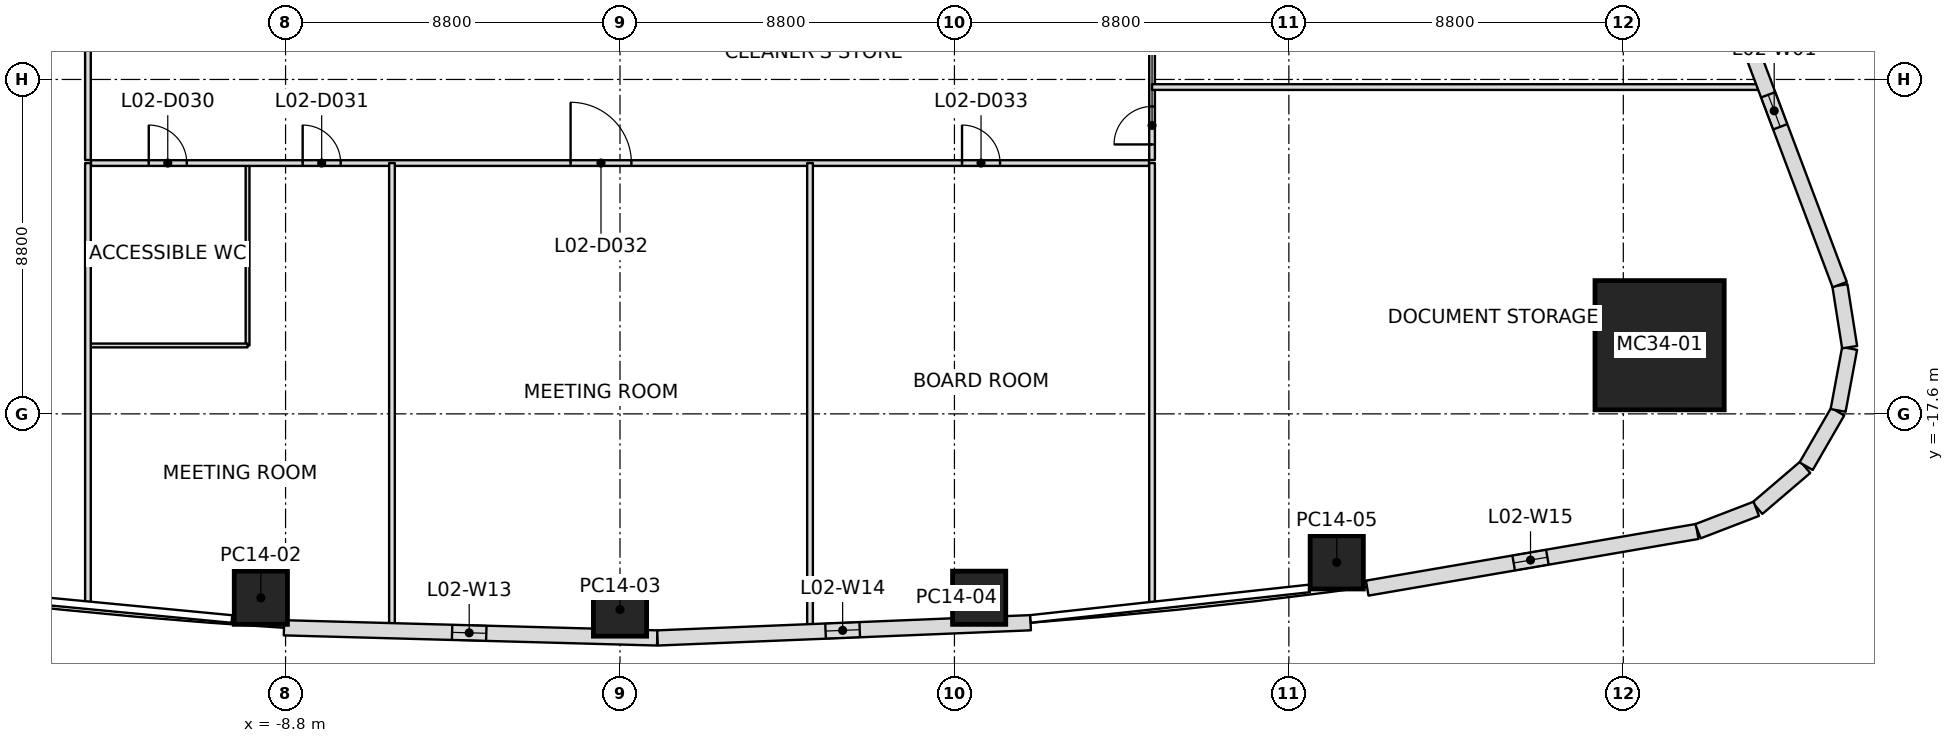
"""IFC4 building model, lengths in metres.
Left out: names, types, materials, properties, quantities, classifications, styles, units other than length and angle.
Written with IfcOpenShell. Run it as: python <this file> out.ifc"""

import sys

from ifc_helpers import new_model, si_unit, direction, frame, frame_2d, origin, origin_2d, place, context, subcontext, project, spatial, rectangle, extrude, element, fill, save


model = new_model("IFC4")
c1 = context("Model", 3, precision=1e-05, world=origin(), true_north=direction((0.0, 1.0)))
c2 = subcontext(c1, "Body", "Model", "MODEL_VIEW")
j1 = project(units=[si_unit("LENGTHUNIT", "METRE"), si_unit("PLANEANGLEUNIT", "RADIAN")], contexts=[c1])
p1 = place(None, origin())
s1 = spatial("IfcSite", under=j1, at=p1, CompositionType="ELEMENT")
p2 = place(p1, origin())
s2 = spatial("IfcBuilding", under=s1, at=p2, CompositionType="ELEMENT")
p3 = place(p2, frame((0.0, 0.0, 16.8)))
s3 = spatial("IfcBuildingStorey", under=s2, at=p3, CompositionType="ELEMENT", Elevation=16.8)
p4 = place(p3, frame((27.355, -15.793, 0.0), z_axis=(0.0, 0.0, 1.0), x_axis=(1.0, 0.0, 0.0)))
e1 = element("IfcColumn", 1, at=p4, inside=s3, PredefinedType="COLUMN", context=c2, shape_type="SweptSolid", body=[
    extrude(rectangle(XDim=3.4, YDim=3.4, at=origin_2d()), origin(), (0.0, 0.0, 1.0), 5.4),
])
for number, where, z_axis, x_axis in (
    (2, (-9.45, -22.439, 0.0), (0.0, 0.0, 1.0), (-0.998, 0.066, 0.0)),
    (3, (0.0, -22.75, 0.0), (0.0, 0.0, 1.0), (1.0, 0.0, 0.0)),
    (4, (9.45, -22.439, 0.0), (0.0, 0.0, 1.0), (0.998, 0.066, 0.0)),
    (5, (18.86, -21.508, 0.0), (0.0, 0.0, 1.0), (0.991, 0.131, 0.0)),
):
    element("IfcColumn", number, at=place(p3, frame(where, z_axis=z_axis, x_axis=x_axis)), inside=s3, PredefinedType="COLUMN", context=c2, shape_type="SweptSolid", body=[
        extrude(rectangle(XDim=1.4, YDim=1.4, at=origin_2d()), origin(), (0.0, 0.0, 1.0), 5.4),
    ])
for number, where, z_axis, x_axis in (
    (6, (31.19, -19.003, 0.0), (0.0, 0.0, 1.0), (-0.76, -0.65, 0.0)),
    (7, (32.041, -17.541, 0.0), (0.0, 0.0, 1.0), (-0.5, -0.866, 0.0)),
    (8, (32.355, -15.878, 0.0), (0.0, 0.0, 1.0), (-0.183, -0.983, 0.0)),
):
    element("IfcWall", number, at=place(p3, frame(where, z_axis=z_axis, x_axis=x_axis)), inside=s3, PredefinedType="STANDARD", context=c2, shape_type="SweptSolid", body=[
        extrude(rectangle(XDim=1.659, YDim=0.4, at=frame_2d((0.829, 0.0))), origin(), (0.0, 0.0, 1.0), 4.5),
    ])
p5 = place(p3, frame((32.099, -14.219, 0.0), z_axis=(0.0, 0.0, 1.0), x_axis=(0.155711266073, -0.98780261268, 0.0)))
e9 = element("IfcWall", 9, at=p5, inside=s3, PredefinedType="STANDARD", context=c2, shape_type="SweptSolid", body=[
    extrude(rectangle(XDim=1.646, YDim=0.4, at=frame_2d((0.823, 0.0))), origin(), (0.0, 0.0, 1.0), 4.5),
])
p6 = place(p3, frame((28.625, -4.993, 0.0), z_axis=(0.0, 0.0, 1.0), x_axis=(0.352569865932, -0.935785493389, 0.0)))
e10 = element("IfcWall", 10, at=p6, inside=s3, PredefinedType="STANDARD", context=c2, shape_type="SweptSolid", body=[
    extrude(rectangle(XDim=9.838, YDim=0.4, at=frame_2d((4.919, 0.0))), origin(), (0.0, 0.0, 1.0), 4.5),
])
p7 = place(p6, frame((4.5, 0.0, 1.2)))
e11 = element("IfcOpeningElement", 11, at=p7, cuts=e10, PredefinedType="OPENING", context=c2, shape_type="SweptSolid", body=[
    extrude(rectangle(XDim=0.9, YDim=2.4, at=frame_2d((0.45, 1.2))), frame((0.0, 0.2, 0.0), z_axis=(0.0, -1.0, 0.0), x_axis=(1.0, 0.0, 0.0)), (0.0, 0.0, 1.0), 0.4),
])
p8 = place(p3, frame((0.98, -23.497, 0.0), z_axis=(0.0, 0.0, 1.0), x_axis=(-0.999629782494, 0.027208416899, 0.0)))
e12 = element("IfcWall", 12, at=p8, inside=s3, PredefinedType="STANDARD", context=c2, shape_type="SweptSolid", body=[
    extrude(rectangle(XDim=9.825, YDim=0.4, at=frame_2d((4.913, 0.0))), origin(), (0.0, 0.0, 1.0), 4.5),
])
p9 = place(p8, frame((4.5, 0.0, 1.2)))
e13 = element("IfcOpeningElement", 13, at=p9, cuts=e12, PredefinedType="OPENING", context=c2, shape_type="SweptSolid", body=[
    extrude(rectangle(XDim=0.9, YDim=2.4, at=frame_2d((0.45, 1.2))), frame((0.0, 0.2, 0.0), z_axis=(0.0, -1.0, 0.0), x_axis=(1.0, 0.0, 0.0)), (0.0, 0.0, 1.0), 0.4),
])
p10 = place(p3, frame((10.804, -23.096, 0.0), z_axis=(0.0, 0.0, 1.0), x_axis=(-0.999167350404, -0.04079958195, 0.0)))
e14 = element("IfcWall", 14, at=p10, inside=s3, PredefinedType="STANDARD", context=c2, shape_type="SweptSolid", body=[
    extrude(rectangle(XDim=9.826, YDim=0.4, at=frame_2d((4.913, 0.0))), origin(), (0.0, 0.0, 1.0), 4.5),
])
p11 = place(p10, frame((4.5, 0.0, 1.2)))
e15 = element("IfcOpeningElement", 15, at=p11, cuts=e14, PredefinedType="OPENING", context=c2, shape_type="SweptSolid", body=[
    extrude(rectangle(XDim=0.9, YDim=2.4, at=frame_2d((0.45, 1.2))), frame((0.0, 0.2, 0.0), z_axis=(0.0, -1.0, 0.0), x_axis=(1.0, 0.0, 0.0)), (0.0, 0.0, 1.0), 0.4),
])
p12 = place(p3, frame((28.344, -20.695, 0.0), z_axis=(0.0, 0.0, 1.0), x_axis=(-0.985570785174, -0.169263780566, 0.0)))
e16 = element("IfcWall", 16, at=p12, inside=s3, PredefinedType="STANDARD", context=c2, shape_type="SweptSolid", body=[
    extrude(rectangle(XDim=8.81, YDim=0.4, at=frame_2d((4.405, 0.0))), origin(), (0.0, 0.0, 1.0), 4.5),
])
p13 = place(p12, frame((4.0, 0.0, 1.2)))
e17 = element("IfcOpeningElement", 17, at=p13, cuts=e16, PredefinedType="OPENING", context=c2, shape_type="SweptSolid", body=[
    extrude(rectangle(XDim=0.9, YDim=2.4, at=frame_2d((0.45, 1.2))), frame((0.0, 0.2, 0.0), z_axis=(0.0, -1.0, 0.0), x_axis=(1.0, 0.0, 0.0)), (0.0, 0.0, 1.0), 0.4),
])
p14 = place(p3, frame((29.9, -20.098, 0.0), z_axis=(0.0, 0.0, 1.0), x_axis=(-0.933315023429, -0.359058584415, 0.0)))
e18 = element("IfcWall", 18, at=p14, inside=s3, PredefinedType="STANDARD", context=c2, shape_type="SweptSolid", body=[
    extrude(rectangle(XDim=1.646, YDim=0.4, at=frame_2d((0.823, 0.0))), origin(), (0.0, 0.0, 1.0), 4.5),
])
p15 = place(p3, frame((-14.0, -11.0, 0.0), z_axis=(0.0, 0.0, 1.0), x_axis=(0.0, -1.0, 0.0)))
e19 = element("IfcWall", 19, at=p15, inside=s3, PredefinedType="PARTITIONING", context=c2, shape_type="SweptSolid", body=[
    extrude(rectangle(XDim=11.697, YDim=0.15, at=frame_2d((5.849, 0.0))), origin(), (0.0, 0.0, 1.0), 4.534),
])
p16 = place(p3, frame((-6.0, -11.0, 0.0), z_axis=(0.0, 0.0, 1.0), x_axis=(0.0, -1.0, 0.0)))
e20 = element("IfcWall", 20, at=p16, inside=s3, PredefinedType="PARTITIONING", context=c2, shape_type="SweptSolid", body=[
    extrude(rectangle(XDim=12.252, YDim=0.15, at=frame_2d((6.126, 0.0))), origin(), (0.0, 0.0, 1.0), 4.534),
])
p17 = place(p3, frame((5.0, -11.0, 0.0), z_axis=(0.0, 0.0, 1.0), x_axis=(0.0, -1.0, 0.0)))
e21 = element("IfcWall", 21, at=p17, inside=s3, PredefinedType="PARTITIONING", context=c2, shape_type="SweptSolid", body=[
    extrude(rectangle(XDim=12.293, YDim=0.15, at=frame_2d((6.146, 0.0))), origin(), (0.0, 0.0, 1.0), 4.534),
])
p18 = place(p3, frame((14.0, -11.0, 0.0), z_axis=(0.0, 0.0, 1.0), x_axis=(0.0, -1.0, 0.0)))
e22 = element("IfcWall", 22, at=p18, inside=s3, PredefinedType="PARTITIONING", context=c2, shape_type="SweptSolid", body=[
    extrude(rectangle(XDim=11.697, YDim=0.15, at=frame_2d((5.849, 0.0))), origin(), (0.0, 0.0, 1.0), 4.534),
])
p19 = place(p3, frame((14.0, -9.0, 0.0), z_axis=(0.0, 0.0, 1.0), x_axis=(1.0, 0.0, 0.0)))
e23 = element("IfcWall", 23, at=p19, inside=s3, PredefinedType="PARTITIONING", context=c2, shape_type="SweptSolid", body=[
    extrude(rectangle(XDim=16.093, YDim=0.15, at=frame_2d((8.046, 0.0))), origin(), (0.0, 0.0, 1.0), 4.534),
])
p20 = place(p3, frame((-14.0, 10.92, 0.0), z_axis=(0.0, 0.0, 1.0), x_axis=(0.0, -1.0, 0.0)))
e24 = element("IfcWall", 24, at=p20, inside=s3, PredefinedType="PARTITIONING", context=c2, shape_type="SweptSolid", body=[
    extrude(rectangle(XDim=21.84, YDim=0.15, at=frame_2d((10.92, 0.0))), origin(), (0.0, 0.0, 1.0), 4.247),
])
p21 = place(p20, frame((5.92, 0.0, 0.0)))
e25 = element("IfcOpeningElement", 25, at=p21, cuts=e24, PredefinedType="OPENING", context=c2, shape_type="SweptSolid", body=[
    extrude(rectangle(XDim=1.0, YDim=2.1, at=frame_2d((0.5, 1.05))), frame((0.0, 0.075, 0.0), z_axis=(0.0, -1.0, 0.0), x_axis=(1.0, 0.0, 0.0)), (0.0, 0.0, 1.0), 0.15),
])
p22 = place(p20, frame((16.93, 0.0, 0.0)))
e26 = element("IfcOpeningElement", 26, at=p22, cuts=e24, PredefinedType="OPENING", context=c2, shape_type="SweptSolid", body=[
    extrude(rectangle(XDim=1.0, YDim=2.1, at=frame_2d((0.5, 1.05))), frame((0.0, 0.075, 0.0), z_axis=(0.0, -1.0, 0.0), x_axis=(1.0, 0.0, 0.0)), (0.0, 0.0, 1.0), 0.15),
])
p23 = place(p3, frame((-13.92, -11.0, 0.0), z_axis=(0.0, 0.0, 1.0), x_axis=(1.0, 0.0, 0.0)))
e27 = element("IfcWall", 27, at=p23, inside=s3, PredefinedType="PARTITIONING", context=c2, shape_type="SweptSolid", body=[
    extrude(rectangle(XDim=27.84, YDim=0.15, at=frame_2d((13.92, 0.0))), origin(), (0.0, 0.0, 1.0), 4.547),
])
p24 = place(p23, frame((1.52, 0.0, 0.0)))
e28 = element("IfcOpeningElement", 28, at=p24, cuts=e27, PredefinedType="OPENING", context=c2, shape_type="SweptSolid", body=[
    extrude(rectangle(XDim=1.0, YDim=2.1, at=frame_2d((0.5, 1.05))), frame((0.0, 0.075, 0.0), z_axis=(0.0, -1.0, 0.0), x_axis=(1.0, 0.0, 0.0)), (0.0, 0.0, 1.0), 0.15),
])
p25 = place(p23, frame((5.57, 0.0, 0.0)))
e29 = element("IfcOpeningElement", 29, at=p25, cuts=e27, PredefinedType="OPENING", context=c2, shape_type="SweptSolid", body=[
    extrude(rectangle(XDim=1.0, YDim=2.1, at=frame_2d((0.5, 1.05))), frame((0.0, 0.075, 0.0), z_axis=(0.0, -1.0, 0.0), x_axis=(1.0, 0.0, 0.0)), (0.0, 0.0, 1.0), 0.15),
])
p26 = place(p23, frame((12.62, 0.0, 0.0)))
e30 = element("IfcOpeningElement", 30, at=p26, cuts=e27, PredefinedType="OPENING", context=c2, shape_type="SweptSolid", body=[
    extrude(rectangle(XDim=1.6, YDim=2.1, at=frame_2d((0.8, 1.05))), frame((0.0, 0.075, 0.0), z_axis=(0.0, -1.0, 0.0), x_axis=(1.0, 0.0, 0.0)), (0.0, 0.0, 1.0), 0.15),
])
p27 = place(p23, frame((22.92, 0.0, 0.0)))
e31 = element("IfcOpeningElement", 31, at=p27, cuts=e27, PredefinedType="OPENING", context=c2, shape_type="SweptSolid", body=[
    extrude(rectangle(XDim=1.0, YDim=2.1, at=frame_2d((0.5, 1.05))), frame((0.0, 0.075, 0.0), z_axis=(0.0, -1.0, 0.0), x_axis=(1.0, 0.0, 0.0)), (0.0, 0.0, 1.0), 0.15),
])
p28 = place(p3, frame((14.0, -10.92, 0.0), z_axis=(0.0, 0.0, 1.0), x_axis=(0.0, 1.0, 0.0)))
e32 = element("IfcWall", 32, at=p28, inside=s3, PredefinedType="PARTITIONING", context=c2, shape_type="SweptSolid", body=[
    extrude(rectangle(XDim=21.84, YDim=0.15, at=frame_2d((10.92, 0.0))), origin(), (0.0, 0.0, 1.0), 4.247),
])
p29 = place(p28, frame((14.52, 0.0, 0.0)))
e33 = element("IfcOpeningElement", 33, at=p29, cuts=e32, PredefinedType="OPENING", context=c2, shape_type="SweptSolid", body=[
    extrude(rectangle(XDim=1.0, YDim=2.1, at=frame_2d((0.5, 1.05))), frame((0.0, 0.075, 0.0), z_axis=(0.0, -1.0, 0.0), x_axis=(1.0, 0.0, 0.0)), (0.0, 0.0, 1.0), 0.15),
])
p30 = place(p28, frame((19.07, 0.0, 0.0)))
e34 = element("IfcOpeningElement", 34, at=p30, cuts=e32, PredefinedType="OPENING", context=c2, shape_type="SweptSolid", body=[
    extrude(rectangle(XDim=1.0, YDim=2.1, at=frame_2d((0.5, 1.05))), frame((0.0, 0.075, 0.0), z_axis=(0.0, -1.0, 0.0), x_axis=(1.0, 0.0, 0.0)), (0.0, 0.0, 1.0), 0.15),
])
p31 = place(p28, frame((0.41, 0.0, 0.0)))
e35 = element("IfcOpeningElement", 35, at=p31, cuts=e32, PredefinedType="OPENING", context=c2, shape_type="SweptSolid", body=[
    extrude(rectangle(XDim=1.0, YDim=2.1, at=frame_2d((0.5, 1.05))), frame((0.0, 0.075, 0.0), z_axis=(0.0, -1.0, 0.0), x_axis=(1.0, 0.0, 0.0)), (0.0, 0.0, 1.0), 0.15),
])
p32 = place(p28, frame((6.92, 0.0, 0.0)))
e36 = element("IfcOpeningElement", 36, at=p32, cuts=e32, PredefinedType="OPENING", context=c2, shape_type="SweptSolid", body=[
    extrude(rectangle(XDim=1.0, YDim=2.1, at=frame_2d((0.5, 1.05))), frame((0.0, 0.075, 0.0), z_axis=(0.0, -1.0, 0.0), x_axis=(1.0, 0.0, 0.0)), (0.0, 0.0, 1.0), 0.15),
])
p33 = place(p3, frame((-9.8, -11.03, 0.0), z_axis=(0.0, 0.0, 1.0), x_axis=(0.0, -1.0, 0.0)))
e37 = element("IfcWall", 37, at=p33, inside=s3, PredefinedType="PARTITIONING", context=c2, shape_type="SweptSolid", body=[
    extrude(rectangle(XDim=4.77, YDim=0.1, at=frame_2d((2.385, 0.0))), origin(), (0.0, 0.0, 1.0), 4.75),
])
p34 = place(p3, frame((-9.8, -15.8, 0.0), z_axis=(0.0, 0.0, 1.0), x_axis=(-1.0, 0.0, 0.0)))
e38 = element("IfcWall", 38, at=p34, inside=s3, PredefinedType="PARTITIONING", context=c2, shape_type="SweptSolid", body=[
    extrude(rectangle(XDim=4.17, YDim=0.1, at=frame_2d((2.085, 0.0))), origin(), (0.0, 0.0, 1.0), 4.617),
])
p35 = place(p7, origin())
e39 = element("IfcWindow", 39, at=p35, inside=s3, PartitioningType="SINGLE_PANEL", PredefinedType="WINDOW", context=c2, shape_type="SweptSolid", body=[
    extrude(rectangle(XDim=0.9, YDim=2.4, at=frame_2d((0.45, 1.2))), frame((0.0, 0.03, 0.0), z_axis=(0.0, -1.0, 0.0), x_axis=(1.0, 0.0, 0.0)), (0.0, 0.0, 1.0), 0.06),
])
fill(e11, e39)
p36 = place(p9, origin())
e40 = element("IfcWindow", 40, at=p36, inside=s3, PartitioningType="SINGLE_PANEL", PredefinedType="WINDOW", context=c2, shape_type="SweptSolid", body=[
    extrude(rectangle(XDim=0.9, YDim=2.4, at=frame_2d((0.45, 1.2))), frame((0.0, 0.03, 0.0), z_axis=(0.0, -1.0, 0.0), x_axis=(1.0, 0.0, 0.0)), (0.0, 0.0, 1.0), 0.06),
])
fill(e13, e40)
p37 = place(p11, origin())
e41 = element("IfcWindow", 41, at=p37, inside=s3, PartitioningType="SINGLE_PANEL", PredefinedType="WINDOW", context=c2, shape_type="SweptSolid", body=[
    extrude(rectangle(XDim=0.9, YDim=2.4, at=frame_2d((0.45, 1.2))), frame((0.0, 0.03, 0.0), z_axis=(0.0, -1.0, 0.0), x_axis=(1.0, 0.0, 0.0)), (0.0, 0.0, 1.0), 0.06),
])
fill(e15, e41)
p38 = place(p13, origin())
e42 = element("IfcWindow", 42, at=p38, inside=s3, PartitioningType="SINGLE_PANEL", PredefinedType="WINDOW", context=c2, shape_type="SweptSolid", body=[
    extrude(rectangle(XDim=0.9, YDim=2.4, at=frame_2d((0.45, 1.2))), frame((0.0, 0.03, 0.0), z_axis=(0.0, -1.0, 0.0), x_axis=(1.0, 0.0, 0.0)), (0.0, 0.0, 1.0), 0.06),
])
fill(e17, e42)
p39 = place(p24, origin())
e43 = element("IfcDoor", 43, at=p39, inside=s3, OperationType="SINGLE_SWING_RIGHT", PredefinedType="DOOR", context=c2, shape_type="SweptSolid", body=[
    extrude(rectangle(XDim=1.0, YDim=2.1, at=frame_2d((0.5, 1.05))), frame((0.0, 0.025, 0.0), z_axis=(0.0, -1.0, 0.0), x_axis=(1.0, 0.0, 0.0)), (0.0, 0.0, 1.0), 0.05),
])
fill(e28, e43)
p40 = place(p25, origin())
e44 = element("IfcDoor", 44, at=p40, inside=s3, OperationType="SINGLE_SWING_LEFT", PredefinedType="DOOR", context=c2, shape_type="SweptSolid", body=[
    extrude(rectangle(XDim=1.0, YDim=2.1, at=frame_2d((0.5, 1.05))), frame((0.0, 0.025, 0.0), z_axis=(0.0, -1.0, 0.0), x_axis=(1.0, 0.0, 0.0)), (0.0, 0.0, 1.0), 0.05),
])
fill(e29, e44)
p41 = place(p26, origin())
e45 = element("IfcDoor", 45, at=p41, inside=s3, OperationType="DOUBLE_DOOR_SINGLE_SWING", PredefinedType="DOOR", context=c2, shape_type="SweptSolid", body=[
    extrude(rectangle(XDim=1.6, YDim=2.1, at=frame_2d((0.8, 1.05))), frame((0.0, 0.025, 0.0), z_axis=(0.0, -1.0, 0.0), x_axis=(1.0, 0.0, 0.0)), (0.0, 0.0, 1.0), 0.05),
])
fill(e30, e45)
p42 = place(p27, origin())
e46 = element("IfcDoor", 46, at=p42, inside=s3, OperationType="SINGLE_SWING_LEFT", PredefinedType="DOOR", context=c2, shape_type="SweptSolid", body=[
    extrude(rectangle(XDim=1.0, YDim=2.1, at=frame_2d((0.5, 1.05))), frame((0.0, 0.025, 0.0), z_axis=(0.0, -1.0, 0.0), x_axis=(1.0, 0.0, 0.0)), (0.0, 0.0, 1.0), 0.05),
])
fill(e31, e46)
p43 = place(p31, origin())
e47 = element("IfcDoor", 47, at=p43, inside=s3, OperationType="SINGLE_SWING_LEFT", PredefinedType="DOOR", context=c2, shape_type="SweptSolid", body=[
    extrude(rectangle(XDim=1.0, YDim=2.1, at=frame_2d((0.5, 1.05))), frame((0.0, 0.025, 0.0), z_axis=(0.0, -1.0, 0.0), x_axis=(1.0, 0.0, 0.0)), (0.0, 0.0, 1.0), 0.05),
])
fill(e35, e47)
save(model, sys.argv[1])
